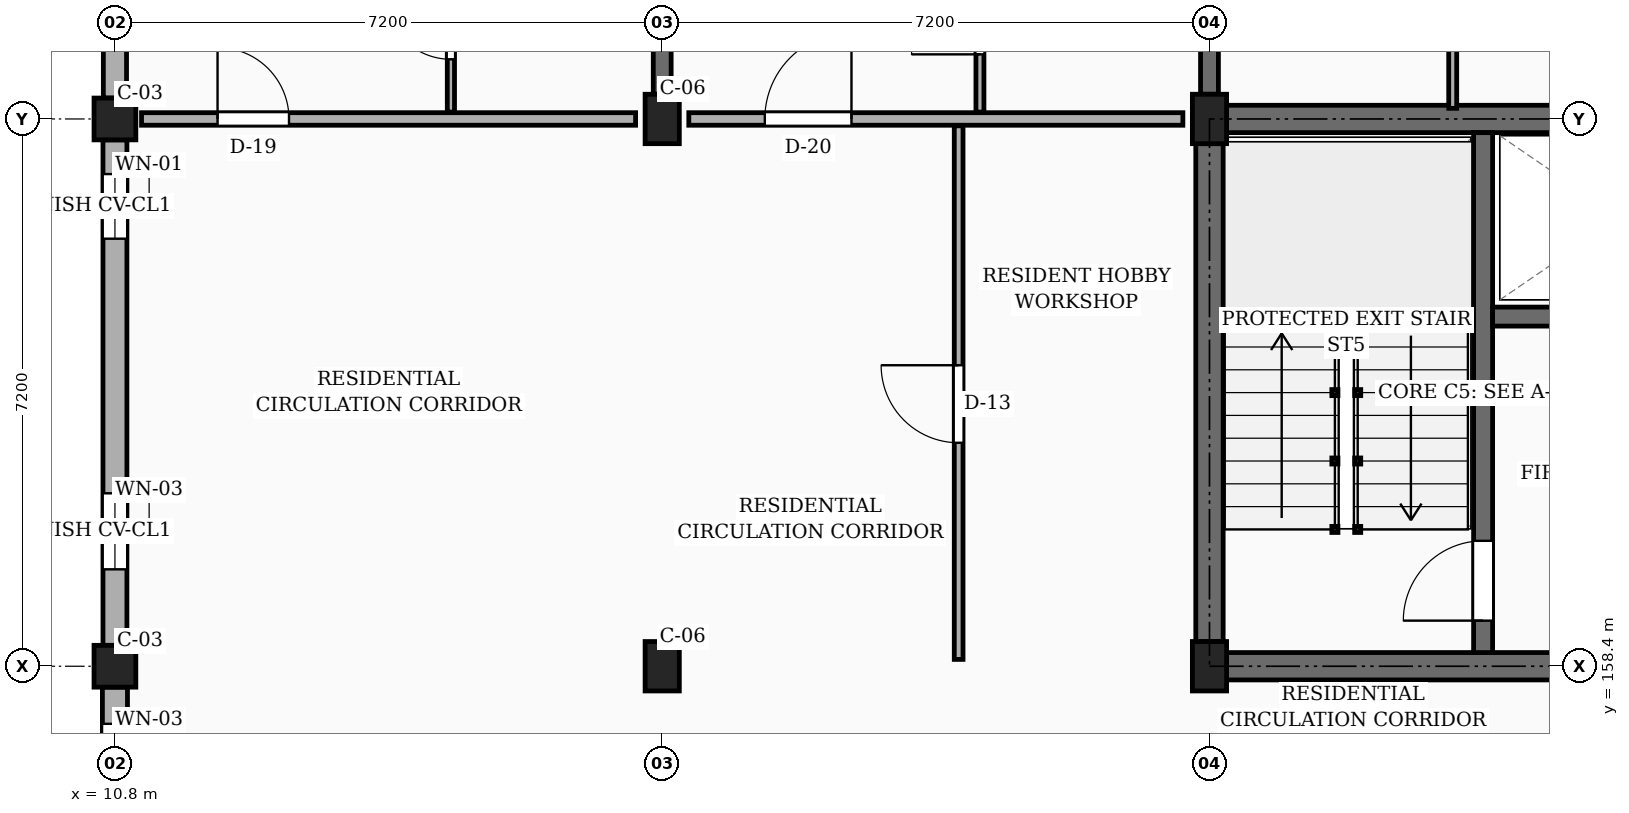
"""IFC4 building model, lengths in metres.
Left out: names, types, materials, properties, quantities, classifications, styles, units other than length and angle.
Written with IfcOpenShell. Run it as: python <this file> out.ifc"""

import sys

from ifc_helpers import new_model, si_unit, direction, frame, frame_2d, origin, origin_2d, place, context, subcontext, project, spatial, rectangle, extrude, element, fill, save


model = new_model("IFC4")
c1 = context("Model", 3, precision=1e-05, world=origin(), true_north=direction((0.0, 1.0)))
c2 = subcontext(c1, "Body", "Model", "MODEL_VIEW")
j1 = project(units=[si_unit("LENGTHUNIT", "METRE"), si_unit("PLANEANGLEUNIT", "RADIAN")], contexts=[c1])
p1 = place(None, origin())
s1 = spatial("IfcSite", under=j1, at=p1, CompositionType="ELEMENT")
p2 = place(p1, origin())
s2 = spatial("IfcBuilding", under=s1, at=p2, CompositionType="ELEMENT")
p3 = place(p2, frame((0.0, 0.0, 20.25)))
s3 = spatial("IfcBuildingStorey", under=s2, at=p3, CompositionType="ELEMENT", Elevation=20.25)
for number, where, z_axis, x_axis in (
    (1, (10.8, 158.4, 0.0), (0.0, 0.0, 1.0), (1.0, 0.0, 0.0)),
    (2, (10.8, 165.6, 0.0), (0.0, 0.0, 1.0), (1.0, 0.0, 0.0)),
):
    element("IfcColumn", number, at=place(p3, frame(where, z_axis=z_axis, x_axis=x_axis)), inside=s3, PredefinedType="COLUMN", context=c2, shape_type="SweptSolid", body=[
        extrude(rectangle(XDim=0.55, YDim=0.55, at=origin_2d()), origin(), (0.0, 0.0, 1.0), 3.15),
    ])
for number, where, z_axis, x_axis in (
    (3, (18.0, 158.4, 0.0), (0.0, 0.0, 1.0), (1.0, 0.0, 0.0)),
    (4, (18.0, 165.6, 0.0), (0.0, 0.0, 1.0), (1.0, 0.0, 0.0)),
    (5, (25.2, 158.4, 0.0), (0.0, 0.0, 1.0), (1.0, 0.0, 0.0)),
    (6, (25.2, 165.6, 0.0), (0.0, 0.0, 1.0), (1.0, 0.0, 0.0)),
):
    element("IfcColumn", number, at=place(p3, frame(where, z_axis=z_axis, x_axis=x_axis)), inside=s3, PredefinedType="COLUMN", context=c2, shape_type="SweptSolid", body=[
        extrude(rectangle(XDim=0.45, YDim=0.65, at=origin_2d()), origin(), (0.0, 0.0, 1.0), 3.15),
    ])
p4 = place(p3, frame((18.0, 165.925, 0.0), z_axis=(0.0, 0.0, 1.0), x_axis=(0.0, 1.0, 0.0)))
e7 = element("IfcWall", 7, at=p4, inside=s3, PredefinedType="SOLIDWALL", context=c2, shape_type="SweptSolid", body=[
    extrude(rectangle(XDim=6.6, YDim=0.235, at=frame_2d((3.3, 0.0))), origin(), (0.0, 0.0, 1.0), 2.185),
])
p5 = place(p3, frame((25.2, 165.925, 0.0), z_axis=(0.0, 0.0, 1.0), x_axis=(0.0, 1.0, 0.0)))
e8 = element("IfcWall", 8, at=p5, inside=s3, PredefinedType="SOLIDWALL", context=c2, shape_type="SweptSolid", body=[
    extrude(rectangle(XDim=6.6, YDim=0.235, at=frame_2d((3.3, 0.0))), origin(), (0.0, 0.0, 1.0), 2.185),
])
p6 = place(p5, frame((4.15, 0.0, 0.0)))
e9 = element("IfcOpeningElement", 9, at=p6, cuts=e8, PredefinedType="OPENING", context=c2, shape_type="SweptSolid", body=[
    extrude(rectangle(XDim=0.98, YDim=2.12, at=frame_2d((0.49, 1.06))), frame((0.0, 0.127, 0.0), z_axis=(0.0, -1.0, 0.0), x_axis=(1.0, 0.0, 0.0)), (0.0, 0.0, 1.0), 0.255),
])
p7 = place(p3, frame((10.8, 172.525, 0.0), z_axis=(0.0, 0.0, 1.0), x_axis=(0.0, -1.0, 0.0)))
e10 = element("IfcWall", 10, at=p7, inside=s3, PredefinedType="SOLIDWALL", context=c2, shape_type="SweptSolid", body=[
    extrude(rectangle(XDim=6.65, YDim=0.305, at=frame_2d((3.325, 0.0))), origin(), (0.0, 0.0, 1.0), 2.455),
])
p8 = place(p7, frame((1.647, 0.0, 0.78)))
e11 = element("IfcOpeningElement", 11, at=p8, cuts=e10, PredefinedType="OPENING", context=c2, shape_type="SweptSolid", body=[
    extrude(rectangle(XDim=1.35, YDim=1.44, at=frame_2d((0.675, 0.72))), frame((0.0, 0.163, 0.0), z_axis=(0.0, -1.0, 0.0), x_axis=(1.0, 0.0, 0.0)), (0.0, 0.0, 1.0), 0.325),
])
p9 = place(p7, frame((5.083, 0.0, 0.78)))
e12 = element("IfcOpeningElement", 12, at=p9, cuts=e10, PredefinedType="OPENING", context=c2, shape_type="SweptSolid", body=[
    extrude(rectangle(XDim=0.85, YDim=1.15, at=frame_2d((0.425, 0.575))), frame((0.0, 0.163, 0.0), z_axis=(0.0, -1.0, 0.0), x_axis=(1.0, 0.0, 0.0)), (0.0, 0.0, 1.0), 0.325),
])
p10 = place(p3, frame((10.8, 165.325, 0.0), z_axis=(0.0, 0.0, 1.0), x_axis=(0.0, -1.0, 0.0)))
e13 = element("IfcWall", 13, at=p10, inside=s3, PredefinedType="SOLIDWALL", context=c2, shape_type="SweptSolid", body=[
    extrude(rectangle(XDim=6.65, YDim=0.315, at=frame_2d((3.325, 0.0))), origin(), (0.0, 0.0, 1.0), 2.455),
])
p11 = place(p10, frame((0.45, 0.0, 0.78)))
e14 = element("IfcOpeningElement", 14, at=p11, cuts=e13, PredefinedType="OPENING", context=c2, shape_type="SweptSolid", body=[
    extrude(rectangle(XDim=0.85, YDim=1.15, at=frame_2d((0.425, 0.575))), frame((0.0, 0.167, 0.0), z_axis=(0.0, -1.0, 0.0), x_axis=(1.0, 0.0, 0.0)), (0.0, 0.0, 1.0), 0.335),
])
p12 = place(p10, frame((4.65, 0.0, 0.78)))
e15 = element("IfcOpeningElement", 15, at=p12, cuts=e13, PredefinedType="OPENING", context=c2, shape_type="SweptSolid", body=[
    extrude(rectangle(XDim=1.0, YDim=1.15, at=frame_2d((0.5, 0.575))), frame((0.0, 0.167, 0.0), z_axis=(0.0, -1.0, 0.0), x_axis=(1.0, 0.0, 0.0)), (0.0, 0.0, 1.0), 0.335),
])
p13 = place(p3, frame((10.8, 158.125, 0.0), z_axis=(0.0, 0.0, 1.0), x_axis=(0.0, -1.0, 0.0)))
e16 = element("IfcWall", 16, at=p13, inside=s3, PredefinedType="SOLIDWALL", context=c2, shape_type="SweptSolid", body=[
    extrude(rectangle(XDim=6.65, YDim=0.33, at=frame_2d((3.325, 0.0))), origin(), (0.0, 0.0, 1.0), 2.455),
])
p14 = place(p13, frame((0.482, 0.0, 0.78)))
e17 = element("IfcOpeningElement", 17, at=p14, cuts=e16, PredefinedType="OPENING", context=c2, shape_type="SweptSolid", body=[
    extrude(rectangle(XDim=1.0, YDim=1.15, at=frame_2d((0.5, 0.575))), frame((0.0, 0.175, 0.0), z_axis=(0.0, -1.0, 0.0), x_axis=(1.0, 0.0, 0.0)), (0.0, 0.0, 1.0), 0.35),
])
p15 = place(p13, frame((2.775, 0.0, 0.78)))
e18 = element("IfcOpeningElement", 18, at=p15, cuts=e16, PredefinedType="OPENING", context=c2, shape_type="SweptSolid", body=[
    extrude(rectangle(XDim=1.16, YDim=1.15, at=frame_2d((0.58, 0.575))), frame((0.0, 0.175, 0.0), z_axis=(0.0, -1.0, 0.0), x_axis=(1.0, 0.0, 0.0)), (0.0, 0.0, 1.0), 0.35),
])
p16 = place(p13, frame((5.177, 0.0, 0.78)))
e19 = element("IfcOpeningElement", 19, at=p16, cuts=e16, PredefinedType="OPENING", context=c2, shape_type="SweptSolid", body=[
    extrude(rectangle(XDim=1.04, YDim=1.26, at=frame_2d((0.52, 0.63))), frame((0.0, 0.175, 0.0), z_axis=(0.0, -1.0, 0.0), x_axis=(1.0, 0.0, 0.0)), (0.0, 0.0, 1.0), 0.35),
])
p17 = place(p3, frame((25.2, 158.725, 0.0), z_axis=(0.0, 0.0, 1.0), x_axis=(0.0, 1.0, 0.0)))
e20 = element("IfcWall", 20, at=p17, inside=s3, PredefinedType="SHEAR", context=c2, shape_type="SweptSolid", body=[
    extrude(rectangle(XDim=6.55, YDim=0.36, at=frame_2d((3.275, 0.0))), origin(), (0.0, 0.0, 1.0), 2.885),
])
p18 = place(p3, frame((25.425, 165.6, 0.0), z_axis=(0.0, 0.0, 1.0), x_axis=(1.0, 0.0, 0.0)))
e21 = element("IfcWall", 21, at=p18, inside=s3, PredefinedType="SHEAR", context=c2, shape_type="SweptSolid", body=[
    extrude(rectangle(XDim=6.75, YDim=0.36, at=frame_2d((3.375, 0.0))), origin(), (0.0, 0.0, 1.0), 2.885),
])
p19 = place(p3, frame((25.425, 158.4, 0.0), z_axis=(0.0, 0.0, 1.0), x_axis=(1.0, 0.0, 0.0)))
e22 = element("IfcWall", 22, at=p19, inside=s3, PredefinedType="SHEAR", context=c2, shape_type="SweptSolid", body=[
    extrude(rectangle(XDim=6.75, YDim=0.36, at=frame_2d((3.375, 0.0))), origin(), (0.0, 0.0, 1.0), 2.885),
])
p20 = place(p19, frame((4.525, 0.0, 0.0)))
e23 = element("IfcOpeningElement", 23, at=p20, cuts=e22, PredefinedType="OPENING", context=c2, shape_type="SweptSolid", body=[
    extrude(rectangle(XDim=1.1, YDim=2.15, at=frame_2d((0.55, 1.075))), frame((0.0, 0.19, 0.0), z_axis=(0.0, -1.0, 0.0), x_axis=(1.0, 0.0, 0.0)), (0.0, 0.0, 1.0), 0.38),
])
p21 = place(p3, frame((28.8, 158.58, 0.0), z_axis=(0.0, 0.0, 1.0), x_axis=(0.0, 1.0, 0.0)))
e24 = element("IfcWall", 24, at=p21, inside=s3, PredefinedType="SHEAR", context=c2, shape_type="SweptSolid", body=[
    extrude(rectangle(XDim=6.84, YDim=0.25, at=frame_2d((3.42, 0.0))), origin(), (0.0, 0.0, 1.0), 2.885),
])
p22 = place(p21, frame((0.42, 0.0, 0.0)))
e25 = element("IfcOpeningElement", 25, at=p22, cuts=e24, PredefinedType="OPENING", context=c2, shape_type="SweptSolid", body=[
    extrude(rectangle(XDim=1.05, YDim=2.15, at=frame_2d((0.525, 1.075))), frame((0.0, 0.135, 0.0), z_axis=(0.0, -1.0, 0.0), x_axis=(1.0, 0.0, 0.0)), (0.0, 0.0, 1.0), 0.27),
])
p23 = place(p3, frame((28.925, 163.0, 0.0), z_axis=(0.0, 0.0, 1.0), x_axis=(1.0, 0.0, 0.0)))
e26 = element("IfcWall", 26, at=p23, inside=s3, PredefinedType="SHEAR", context=c2, shape_type="SweptSolid", body=[
    extrude(rectangle(XDim=3.295, YDim=0.25, at=frame_2d((1.647, 0.0))), origin(), (0.0, 0.0, 1.0), 2.885),
])
p24 = place(p23, frame((1.1, 0.0, 0.0)))
e27 = element("IfcOpeningElement", 27, at=p24, cuts=e26, PredefinedType="OPENING", context=c2, shape_type="SweptSolid", body=[
    extrude(rectangle(XDim=1.1, YDim=2.2, at=frame_2d((0.55, 1.1))), frame((0.0, 0.135, 0.0), z_axis=(0.0, -1.0, 0.0), x_axis=(1.0, 0.0, 0.0)), (0.0, 0.0, 1.0), 0.27),
])
p25 = place(p3, frame((11.15, 165.6, 0.0), z_axis=(0.0, 0.0, 1.0), x_axis=(1.0, 0.0, 0.0)))
e28 = element("IfcWall", 28, at=p25, inside=s3, PredefinedType="PARTITIONING", context=c2, shape_type="SweptSolid", body=[
    extrude(rectangle(XDim=6.5, YDim=0.165, at=frame_2d((3.25, 0.0))), origin(), (0.0, 0.0, 1.0), 2.32),
])
p26 = place(p25, frame((1.0, 0.0, 0.0)))
e29 = element("IfcOpeningElement", 29, at=p26, cuts=e28, PredefinedType="OPENING", context=c2, shape_type="SweptSolid", body=[
    extrude(rectangle(XDim=0.94, YDim=2.12, at=frame_2d((0.47, 1.06))), frame((0.0, 0.093, 0.0), z_axis=(0.0, -1.0, 0.0), x_axis=(1.0, 0.0, 0.0)), (0.0, 0.0, 1.0), 0.185),
])
p27 = place(p3, frame((18.35, 165.6, 0.0), z_axis=(0.0, 0.0, 1.0), x_axis=(1.0, 0.0, 0.0)))
e30 = element("IfcWall", 30, at=p27, inside=s3, PredefinedType="PARTITIONING", context=c2, shape_type="SweptSolid", body=[
    extrude(rectangle(XDim=6.5, YDim=0.165, at=frame_2d((3.25, 0.0))), origin(), (0.0, 0.0, 1.0), 2.32),
])
p28 = place(p27, frame((1.0, 0.0, 0.0)))
e31 = element("IfcOpeningElement", 31, at=p28, cuts=e30, PredefinedType="OPENING", context=c2, shape_type="SweptSolid", body=[
    extrude(rectangle(XDim=1.14, YDim=2.18, at=frame_2d((0.57, 1.09))), frame((0.0, 0.093, 0.0), z_axis=(0.0, -1.0, 0.0), x_axis=(1.0, 0.0, 0.0)), (0.0, 0.0, 1.0), 0.185),
])
p29 = place(p3, frame((15.22, 165.69, 0.0), z_axis=(0.0, 0.0, 1.0), x_axis=(0.0, 1.0, 0.0)))
e32 = element("IfcWall", 32, at=p29, inside=s3, PredefinedType="PARTITIONING", context=c2, shape_type="SweptSolid", body=[
    extrude(rectangle(XDim=2.26, YDim=0.095, at=frame_2d((1.13, 0.0))), origin(), (0.0, 0.0, 1.0), 2.32),
])
p30 = place(p29, frame((0.695, 0.0, 0.0)))
e33 = element("IfcOpeningElement", 33, at=p30, cuts=e32, PredefinedType="OPENING", context=c2, shape_type="SweptSolid", body=[
    extrude(rectangle(XDim=0.87, YDim=2.05, at=frame_2d((0.435, 1.025))), frame((0.0, 0.058, 0.0), z_axis=(0.0, -1.0, 0.0), x_axis=(1.0, 0.0, 0.0)), (0.0, 0.0, 1.0), 0.115),
])
p31 = place(p3, frame((21.9, 158.49, 0.0), z_axis=(0.0, 0.0, 1.0), x_axis=(0.0, 1.0, 0.0)))
e34 = element("IfcWall", 34, at=p31, inside=s3, PredefinedType="PARTITIONING", context=c2, shape_type="SweptSolid", body=[
    extrude(rectangle(XDim=7.02, YDim=0.115, at=frame_2d((3.51, 0.0))), origin(), (0.0, 0.0, 1.0), 2.32),
])
p32 = place(p31, frame((2.85, 0.0, 0.0)))
e35 = element("IfcOpeningElement", 35, at=p32, cuts=e34, PredefinedType="OPENING", context=c2, shape_type="SweptSolid", body=[
    extrude(rectangle(XDim=1.02, YDim=2.15, at=frame_2d((0.51, 1.075))), frame((0.0, 0.067, 0.0), z_axis=(0.0, -1.0, 0.0), x_axis=(1.0, 0.0, 0.0)), (0.0, 0.0, 1.0), 0.135),
])
p33 = place(p3, frame((22.18, 165.69, 0.0), z_axis=(0.0, 0.0, 1.0), x_axis=(0.0, 1.0, 0.0)))
e36 = element("IfcWall", 36, at=p33, inside=s3, PredefinedType="PARTITIONING", context=c2, shape_type="SweptSolid", body=[
    extrude(rectangle(XDim=2.42, YDim=0.105, at=frame_2d((1.21, 0.0))), origin(), (0.0, 0.0, 1.0), 2.32),
])
p34 = place(p33, frame((0.76, 0.0, 0.0)))
e37 = element("IfcOpeningElement", 37, at=p34, cuts=e36, PredefinedType="OPENING", context=c2, shape_type="SweptSolid", body=[
    extrude(rectangle(XDim=0.9, YDim=2.05, at=frame_2d((0.45, 1.025))), frame((0.0, 0.062, 0.0), z_axis=(0.0, -1.0, 0.0), x_axis=(1.0, 0.0, 0.0)), (0.0, 0.0, 1.0), 0.125),
])
p35 = place(p3, frame((28.4, 165.74, 0.0), z_axis=(0.0, 0.0, 1.0), x_axis=(0.0, 1.0, 0.0)))
e38 = element("IfcWall", 38, at=p35, inside=s3, PredefinedType="PARTITIONING", context=c2, shape_type="SweptSolid", body=[
    extrude(rectangle(XDim=3.39, YDim=0.105, at=frame_2d((1.695, 0.0))), origin(), (0.0, 0.0, 1.0), 2.32),
])
p36 = place(p11, origin())
e39 = element("IfcWindow", 39, at=p36, inside=s3, PartitioningType="SINGLE_PANEL", PredefinedType="WINDOW", context=c2, shape_type="SweptSolid", body=[
    extrude(rectangle(XDim=0.85, YDim=1.15, at=frame_2d((0.425, 0.575))), frame((0.0, 0.03, 0.0), z_axis=(0.0, -1.0, 0.0), x_axis=(1.0, 0.0, 0.0)), (0.0, 0.0, 1.0), 0.06),
])
fill(e14, e39)
p37 = place(p12, origin())
e40 = element("IfcWindow", 40, at=p37, inside=s3, PartitioningType="SINGLE_PANEL", PredefinedType="WINDOW", context=c2, shape_type="SweptSolid", body=[
    extrude(rectangle(XDim=1.0, YDim=1.15, at=frame_2d((0.5, 0.575))), frame((0.0, 0.03, 0.0), z_axis=(0.0, -1.0, 0.0), x_axis=(1.0, 0.0, 0.0)), (0.0, 0.0, 1.0), 0.06),
])
fill(e15, e40)
p38 = place(p14, origin())
e41 = element("IfcWindow", 41, at=p38, inside=s3, PartitioningType="SINGLE_PANEL", PredefinedType="WINDOW", context=c2, shape_type="SweptSolid", body=[
    extrude(rectangle(XDim=1.0, YDim=1.15, at=frame_2d((0.5, 0.575))), frame((0.0, 0.03, 0.0), z_axis=(0.0, -1.0, 0.0), x_axis=(1.0, 0.0, 0.0)), (0.0, 0.0, 1.0), 0.06),
])
fill(e17, e41)
p39 = place(p22, origin())
e42 = element("IfcDoor", 42, at=p39, inside=s3, OperationType="SINGLE_SWING_LEFT", PredefinedType="DOOR", context=c2, shape_type="SweptSolid", body=[
    extrude(rectangle(XDim=1.05, YDim=2.15, at=frame_2d((0.525, 1.075))), frame((0.0, 0.025, 0.0), z_axis=(0.0, -1.0, 0.0), x_axis=(1.0, 0.0, 0.0)), (0.0, 0.0, 1.0), 0.05),
])
fill(e25, e42)
p40 = place(p26, origin())
e43 = element("IfcDoor", 43, at=p40, inside=s3, OperationType="SINGLE_SWING_LEFT", PredefinedType="DOOR", context=c2, shape_type="SweptSolid", body=[
    extrude(rectangle(XDim=0.94, YDim=2.12, at=frame_2d((0.47, 1.06))), frame((0.0, 0.025, 0.0), z_axis=(0.0, -1.0, 0.0), x_axis=(1.0, 0.0, 0.0)), (0.0, 0.0, 1.0), 0.05),
])
fill(e29, e43)
p41 = place(p28, origin())
e44 = element("IfcDoor", 44, at=p41, inside=s3, OperationType="SINGLE_SWING_RIGHT", PredefinedType="DOOR", context=c2, shape_type="SweptSolid", body=[
    extrude(rectangle(XDim=1.14, YDim=2.18, at=frame_2d((0.57, 1.09))), frame((0.0, 0.025, 0.0), z_axis=(0.0, -1.0, 0.0), x_axis=(1.0, 0.0, 0.0)), (0.0, 0.0, 1.0), 0.05),
])
fill(e31, e44)
p42 = place(p30, origin())
e45 = element("IfcDoor", 45, at=p42, inside=s3, OperationType="SINGLE_SWING_RIGHT", PredefinedType="DOOR", context=c2, shape_type="SweptSolid", body=[
    extrude(rectangle(XDim=0.87, YDim=2.05, at=frame_2d((0.435, 1.025))), frame((0.0, 0.025, 0.0), z_axis=(0.0, -1.0, 0.0), x_axis=(1.0, 0.0, 0.0)), (0.0, 0.0, 1.0), 0.05),
])
fill(e33, e45)
p43 = place(p32, origin())
e46 = element("IfcDoor", 46, at=p43, inside=s3, OperationType="SINGLE_SWING_RIGHT", PredefinedType="DOOR", context=c2, shape_type="SweptSolid", body=[
    extrude(rectangle(XDim=1.02, YDim=2.15, at=frame_2d((0.51, 1.075))), frame((0.0, 0.025, 0.0), z_axis=(0.0, -1.0, 0.0), x_axis=(1.0, 0.0, 0.0)), (0.0, 0.0, 1.0), 0.05),
])
fill(e35, e46)
p44 = place(p34, origin())
e47 = element("IfcDoor", 47, at=p44, inside=s3, OperationType="SINGLE_SWING_LEFT", PredefinedType="DOOR", context=c2, shape_type="SweptSolid", body=[
    extrude(rectangle(XDim=0.9, YDim=2.05, at=frame_2d((0.45, 1.025))), frame((0.0, 0.025, 0.0), z_axis=(0.0, -1.0, 0.0), x_axis=(1.0, 0.0, 0.0)), (0.0, 0.0, 1.0), 0.05),
])
fill(e37, e47)
save(model, sys.argv[1])
